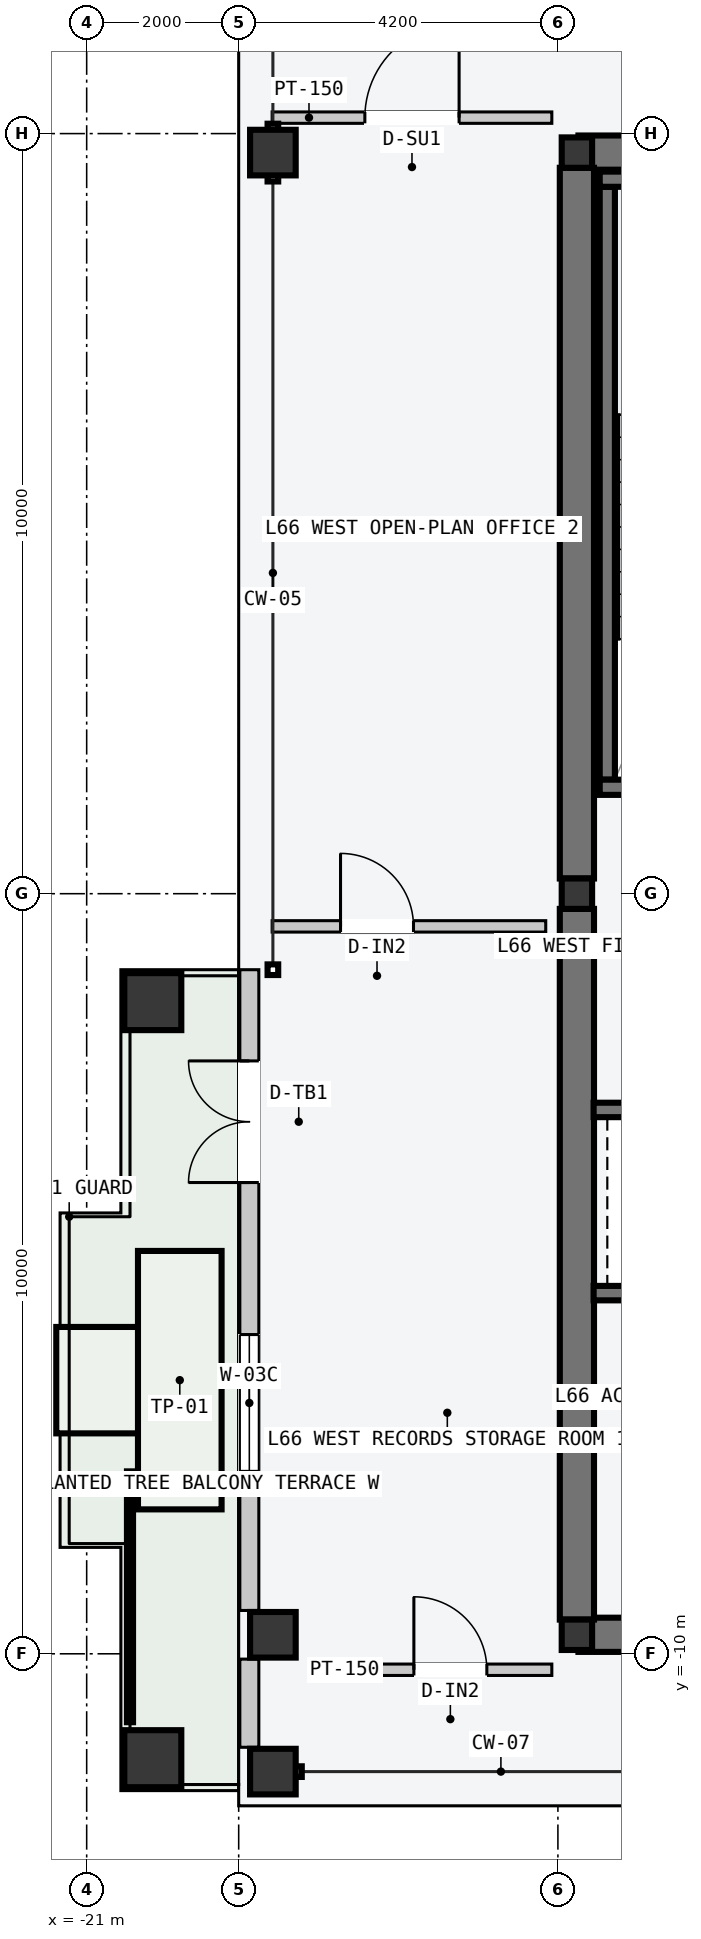
"""IFC4 building model, lengths in metres.
Left out: names, types, materials, properties, quantities, classifications, styles, units other than length and angle.
Written with IfcOpenShell. Run it as: python <this file> out.ifc"""

import sys

from ifc_helpers import new_model, si_unit, direction, frame, frame_2d, origin, origin_2d, place, context, subcontext, project, spatial, rectangle, hollow_rectangle, i_section, extrude, element, fill, save


model = new_model("IFC4")
c1 = context("Model", 3, precision=1e-05, world=origin(), true_north=direction((0.0, 1.0)))
c2 = subcontext(c1, "Body", "Model", "MODEL_VIEW")
j1 = project(units=[si_unit("LENGTHUNIT", "METRE"), si_unit("PLANEANGLEUNIT", "RADIAN")], contexts=[c1])
p1 = place(None, origin())
s1 = spatial("IfcSite", under=j1, at=p1, CompositionType="ELEMENT")
p2 = place(p1, origin())
s2 = spatial("IfcBuilding", under=s1, at=p2, CompositionType="ELEMENT")
p3 = place(p2, frame((0.0, 0.0, 250.8)))
s3 = spatial("IfcBuildingStorey", under=s2, at=p3, CompositionType="ELEMENT", Elevation=250.8)
for number, where, z_axis, x_axis in (
    (1, (-14.53, -9.75, -0.2), (0.0, 0.0, 1.0), (1.0, 0.0, 0.0)),
    (2, (-14.53, 9.75, -0.2), (0.0, 0.0, 1.0), (1.0, 0.0, 0.0)),
):
    element("IfcWall", number, at=place(p3, frame(where, z_axis=z_axis, x_axis=x_axis)), inside=s3, PredefinedType="SHEAR", context=c2, shape_type="SweptSolid", body=[
        extrude(rectangle(XDim=6.46, YDim=0.45, at=frame_2d((3.23, 0.0))), origin(), (0.0, 0.0, 1.0), 3.6),
    ])
for number, where, z_axis, x_axis in (
    (3, (-14.55, -9.55, -0.2), (0.0, 0.0, 1.0), (0.0, 1.0, 0.0)),
    (4, (-14.55, 0.2, -0.2), (0.0, 0.0, 1.0), (0.0, 1.0, 0.0)),
):
    element("IfcWall", number, at=place(p3, frame(where, z_axis=z_axis, x_axis=x_axis)), inside=s3, PredefinedType="SHEAR", context=c2, shape_type="SweptSolid", body=[
        extrude(rectangle(XDim=9.35, YDim=0.45, at=frame_2d((4.675, 0.0))), origin(), (0.0, 0.0, 1.0), 3.6),
    ])
p4 = place(p3, frame((-14.15, 1.5, -0.2), z_axis=(0.0, 0.0, 1.0), x_axis=(0.0, 1.0, 0.0)))
e5 = element("IfcWall", 5, at=p4, inside=s3, PredefinedType="SOLIDWALL", context=c2, shape_type="SweptSolid", body=[
    extrude(rectangle(XDim=7.8, YDim=0.2, at=frame_2d((3.9, 0.0))), origin(), (0.0, 0.0, 1.0), 3.6),
])
p5 = place(p3, frame((-14.25, 1.4, -0.2), z_axis=(0.0, 0.0, 1.0), x_axis=(1.0, 0.0, 0.0)))
e6 = element("IfcWall", 6, at=p5, inside=s3, PredefinedType="SOLIDWALL", context=c2, shape_type="SweptSolid", body=[
    extrude(rectangle(XDim=3.72, YDim=0.2, at=frame_2d((1.86, 0.0))), origin(), (0.0, 0.0, 1.0), 3.6),
])
p6 = place(p5, frame((1.5, 0.0, 0.2)))
e7 = element("IfcOpeningElement", 7, at=p6, cuts=e6, PredefinedType="OPENING", context=c2, shape_type="SweptSolid", body=[
    extrude(rectangle(XDim=1.12, YDim=2.18, at=frame_2d((0.56, 1.09))), frame((0.0, 0.11, 0.0), z_axis=(0.0, -1.0, 0.0), x_axis=(1.0, 0.0, 0.0)), (0.0, 0.0, 1.0), 0.22),
])
p7 = place(p3, frame((-14.25, 9.4, -0.2), z_axis=(0.0, 0.0, 1.0), x_axis=(1.0, 0.0, 0.0)))
e8 = element("IfcWall", 8, at=p7, inside=s3, PredefinedType="SOLIDWALL", context=c2, shape_type="SweptSolid", body=[
    extrude(rectangle(XDim=3.72, YDim=0.2, at=frame_2d((1.86, 0.0))), origin(), (0.0, 0.0, 1.0), 3.6),
])
for number, where, z_axis, x_axis in (
    (9, (-14.55, -9.75, 0.0), (0.0, 0.0, 1.0), (1.0, 0.0, 0.0)),
    (10, (-14.55, 0.0, 0.0), (0.0, 0.0, 1.0), (1.0, 0.0, 0.0)),
    (11, (-14.55, 9.75, 0.0), (0.0, 0.0, 1.0), (1.0, 0.0, 0.0)),
):
    element("IfcColumn", number, at=place(p3, frame(where, z_axis=z_axis, x_axis=x_axis)), inside=s3, PredefinedType="COLUMN", context=c2, shape_type="SweptSolid", body=[
        extrude(i_section(OverallWidth=0.4, OverallDepth=0.4, WebThickness=0.013, FlangeThickness=0.021, at=origin_2d()), origin(), (0.0, 0.0, 1.0), 3.6),
    ])
for number, where, z_axis, x_axis in (
    (12, (-18.55, -11.55, 0.0), (0.0, 0.0, 1.0), (0.0, 1.0, 0.0)),
    (13, (-18.55, -9.75, 0.0), (0.0, 0.0, 1.0), (0.0, 1.0, 0.0)),
    (14, (-18.55, 9.75, 0.0), (0.0, 0.0, 1.0), (0.0, 1.0, 0.0)),
):
    element("IfcColumn", number, at=place(p3, frame(where, z_axis=z_axis, x_axis=x_axis)), inside=s3, PredefinedType="COLUMN", context=c2, shape_type="SweptSolid", body=[
        extrude(hollow_rectangle(XDim=0.6, YDim=0.6, WallThickness=0.025, at=origin_2d()), origin(), (0.0, 0.0, 1.0), 3.6),
    ])
for number, where, z_axis, x_axis in (
    (15, (-20.13, -11.38, 0.0), (0.0, 0.0, 1.0), (0.0, 1.0, 0.0)),
    (16, (-20.13, -1.42, 0.0), (0.0, 0.0, 1.0), (0.0, 1.0, 0.0)),
):
    element("IfcColumn", number, at=place(p3, frame(where, z_axis=z_axis, x_axis=x_axis)), inside=s3, PredefinedType="COLUMN", context=c2, shape_type="SweptSolid", body=[
        extrude(hollow_rectangle(XDim=0.75, YDim=0.75, WallThickness=0.032, at=origin_2d()), origin(), (0.0, 0.0, 1.0), 3.6),
    ])
p8 = place(p3, frame((-18.86, -11.23, 0.0), z_axis=(0.0, 0.0, 1.0), x_axis=(0.0, 1.0, 0.0)))
e17 = element("IfcWall", 17, at=p8, inside=s3, PredefinedType="STANDARD", context=c2, shape_type="SweptSolid", body=[
    extrude(rectangle(XDim=1.16, YDim=0.25, at=frame_2d((0.58, 0.0))), origin(), (0.0, 0.0, 1.0), 3.4),
])
p9 = place(p3, frame((-18.86, -9.43, 0.0), z_axis=(0.0, 0.0, 1.0), x_axis=(0.0, 1.0, 0.0)))
e18 = element("IfcWall", 18, at=p9, inside=s3, PredefinedType="STANDARD", context=c2, shape_type="SweptSolid", body=[
    extrude(rectangle(XDim=8.43, YDim=0.25, at=frame_2d((4.215, 0.0))), origin(), (0.0, 0.0, 1.0), 3.4),
])
p10 = place(p9, frame((5.63, 0.0, 0.0)))
e19 = element("IfcOpeningElement", 19, at=p10, cuts=e18, PredefinedType="OPENING", context=c2, shape_type="SweptSolid", body=[
    extrude(rectangle(XDim=1.6, YDim=2.2, at=frame_2d((0.8, 1.1))), frame((0.0, 0.135, 0.0), z_axis=(0.0, -1.0, 0.0), x_axis=(1.0, 0.0, 0.0)), (0.0, 0.0, 1.0), 0.27),
])
p11 = place(p9, frame((1.83, 0.0, 0.85)))
e20 = element("IfcOpeningElement", 20, at=p11, cuts=e18, PredefinedType="OPENING", context=c2, shape_type="SweptSolid", body=[
    extrude(rectangle(XDim=1.8, YDim=2.05, at=frame_2d((0.9, 1.025))), frame((0.0, 0.135, 0.0), z_axis=(0.0, -1.0, 0.0), x_axis=(1.0, 0.0, 0.0)), (0.0, 0.0, 1.0), 0.27),
])
p12 = place(p3, frame((-14.33, -2.845, -0.2), z_axis=(0.0, 0.0, 1.0), x_axis=(1.0, 0.0, 0.0)))
e21 = element("IfcWall", 21, at=p12, inside=s3, PredefinedType="SOLIDWALL", context=c2, shape_type="SweptSolid", body=[
    extrude(rectangle(XDim=2.68, YDim=0.19, at=frame_2d((1.34, 0.0))), origin(), (0.0, 0.0, 1.0), 3.6),
])
p13 = place(p12, frame((0.83, 0.0, 0.2)))
e22 = element("IfcOpeningElement", 22, at=p13, cuts=e21, PredefinedType="OPENING", context=c2, shape_type="SweptSolid", body=[
    extrude(rectangle(XDim=1.2, YDim=2.2, at=frame_2d((0.6, 1.1))), frame((0.0, 0.105, 0.0), z_axis=(0.0, -1.0, 0.0), x_axis=(1.0, 0.0, 0.0)), (0.0, 0.0, 1.0), 0.21),
])
p14 = place(p3, frame((-14.33, -5.255, -0.2), z_axis=(0.0, 0.0, 1.0), x_axis=(1.0, 0.0, 0.0)))
e23 = element("IfcWall", 23, at=p14, inside=s3, PredefinedType="SOLIDWALL", context=c2, shape_type="SweptSolid", body=[
    extrude(rectangle(XDim=2.68, YDim=0.19, at=frame_2d((1.34, 0.0))), origin(), (0.0, 0.0, 1.0), 3.6),
])
p15 = place(p3, frame((-18.56, 10.21, 0.0), z_axis=(0.0, 0.0, 1.0), x_axis=(1.0, 0.0, 0.0)))
e24 = element("IfcWall", 24, at=p15, inside=s3, PredefinedType="PARTITIONING", context=c2, shape_type="SweptSolid", body=[
    extrude(rectangle(XDim=3.68, YDim=0.15, at=frame_2d((1.84, 0.0))), origin(), (0.0, 0.0, 1.0), 3.4),
])
p16 = place(p15, frame((1.22, 0.0, 0.0)))
e25 = element("IfcOpeningElement", 25, at=p16, cuts=e24, PredefinedType="OPENING", context=c2, shape_type="SweptSolid", body=[
    extrude(rectangle(XDim=1.24, YDim=2.24, at=frame_2d((0.62, 1.12))), frame((0.0, 0.085, 0.0), z_axis=(0.0, -1.0, 0.0), x_axis=(1.0, 0.0, 0.0)), (0.0, 0.0, 1.0), 0.17),
])
p17 = place(p3, frame((-17.55, -10.21, 0.0), z_axis=(0.0, 0.0, 1.0), x_axis=(1.0, 0.0, 0.0)))
e26 = element("IfcWall", 26, at=p17, inside=s3, PredefinedType="PARTITIONING", context=c2, shape_type="SweptSolid", body=[
    extrude(rectangle(XDim=2.67, YDim=0.15, at=frame_2d((1.335, 0.0))), origin(), (0.0, 0.0, 1.0), 3.4),
])
p18 = place(p17, frame((0.855, 0.0, 0.0)))
e27 = element("IfcOpeningElement", 27, at=p18, cuts=e26, PredefinedType="OPENING", context=c2, shape_type="SweptSolid", body=[
    extrude(rectangle(XDim=0.96, YDim=2.18, at=frame_2d((0.48, 1.09))), frame((0.0, 0.085, 0.0), z_axis=(0.0, -1.0, 0.0), x_axis=(1.0, 0.0, 0.0)), (0.0, 0.0, 1.0), 0.17),
])
p19 = place(p3, frame((-18.56, -0.43, 0.0), z_axis=(0.0, 0.0, 1.0), x_axis=(1.0, 0.0, 0.0)))
e28 = element("IfcWall", 28, at=p19, inside=s3, PredefinedType="PARTITIONING", context=c2, shape_type="SweptSolid", body=[
    extrude(rectangle(XDim=3.6, YDim=0.15, at=frame_2d((1.8, 0.0))), origin(), (0.0, 0.0, 1.0), 3.4),
])
p20 = place(p19, frame((0.9, 0.0, 0.0)))
e29 = element("IfcOpeningElement", 29, at=p20, cuts=e28, PredefinedType="OPENING", context=c2, shape_type="SweptSolid", body=[
    extrude(rectangle(XDim=0.96, YDim=2.18, at=frame_2d((0.48, 1.09))), frame((0.0, 0.085, 0.0), z_axis=(0.0, -1.0, 0.0), x_axis=(1.0, 0.0, 0.0)), (0.0, 0.0, 1.0), 0.17),
])
p21 = place(p10, origin())
e30 = element("IfcDoor", 30, at=p21, inside=s3, OperationType="DOUBLE_DOOR_SINGLE_SWING", PredefinedType="DOOR", context=c2, shape_type="SweptSolid", body=[
    extrude(rectangle(XDim=1.6, YDim=2.2, at=frame_2d((0.8, 1.1))), frame((0.0, 0.025, 0.0), z_axis=(0.0, -1.0, 0.0), x_axis=(1.0, 0.0, 0.0)), (0.0, 0.0, 1.0), 0.05),
])
fill(e19, e30)
p22 = place(p11, origin())
e31 = element("IfcWindow", 31, at=p22, inside=s3, PartitioningType="SINGLE_PANEL", PredefinedType="WINDOW", context=c2, shape_type="SweptSolid", body=[
    extrude(rectangle(XDim=1.8, YDim=2.05, at=frame_2d((0.9, 1.025))), frame((0.0, 0.03, 0.0), z_axis=(0.0, -1.0, 0.0), x_axis=(1.0, 0.0, 0.0)), (0.0, 0.0, 1.0), 0.06),
])
fill(e20, e31)
p23 = place(p16, origin())
e32 = element("IfcDoor", 32, at=p23, inside=s3, OperationType="SINGLE_SWING_RIGHT", PredefinedType="DOOR", context=c2, shape_type="SweptSolid", body=[
    extrude(rectangle(XDim=1.24, YDim=2.24, at=frame_2d((0.62, 1.12))), frame((0.0, 0.025, 0.0), z_axis=(0.0, -1.0, 0.0), x_axis=(1.0, 0.0, 0.0)), (0.0, 0.0, 1.0), 0.05),
])
fill(e25, e32)
p24 = place(p18, origin())
e33 = element("IfcDoor", 33, at=p24, inside=s3, OperationType="SINGLE_SWING_LEFT", PredefinedType="DOOR", context=c2, shape_type="SweptSolid", body=[
    extrude(rectangle(XDim=0.96, YDim=2.18, at=frame_2d((0.48, 1.09))), frame((0.0, 0.025, 0.0), z_axis=(0.0, -1.0, 0.0), x_axis=(1.0, 0.0, 0.0)), (0.0, 0.0, 1.0), 0.05),
])
fill(e27, e33)
p25 = place(p20, origin())
e34 = element("IfcDoor", 34, at=p25, inside=s3, OperationType="SINGLE_SWING_LEFT", PredefinedType="DOOR", context=c2, shape_type="SweptSolid", body=[
    extrude(rectangle(XDim=0.96, YDim=2.18, at=frame_2d((0.48, 1.09))), frame((0.0, 0.025, 0.0), z_axis=(0.0, -1.0, 0.0), x_axis=(1.0, 0.0, 0.0)), (0.0, 0.0, 1.0), 0.05),
])
fill(e29, e34)
save(model, sys.argv[1])
